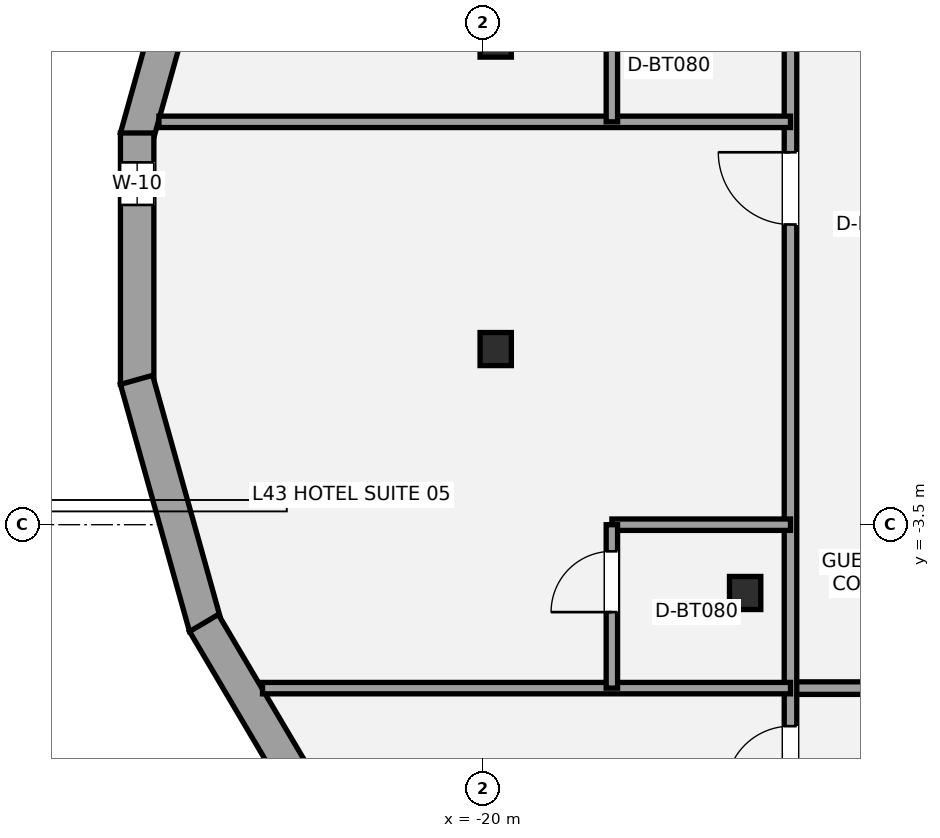
"""IFC4 building model, lengths in metres.
Left out: names, types, materials, properties, quantities, classifications, styles, units other than length and angle.
Written with IfcOpenShell. Run it as: python <this file> out.ifc"""

import sys

from ifc_helpers import new_model, si_unit, direction, frame, frame_2d, origin, origin_2d, place, context, subcontext, project, spatial, rectangle, i_section, extrude, element, fill, save


model = new_model("IFC4")
c1 = context("Model", 3, precision=1e-05, world=origin(), true_north=direction((0.0, 1.0)))
c2 = subcontext(c1, "Body", "Model", "MODEL_VIEW")
j1 = project(units=[si_unit("LENGTHUNIT", "METRE"), si_unit("PLANEANGLEUNIT", "RADIAN")], contexts=[c1])
p1 = place(None, origin())
s1 = spatial("IfcSite", under=j1, at=p1, CompositionType="ELEMENT")
p2 = place(p1, origin())
s2 = spatial("IfcBuilding", under=s1, at=p2, CompositionType="ELEMENT")
p3 = place(p2, frame((0.0, 0.0, 159.8)))
s3 = spatial("IfcBuildingStorey", under=s2, at=p3, CompositionType="ELEMENT", Elevation=159.8)
for number, where, z_axis, x_axis in (
    (1, (-19.828, 2.869, 0.0), (0.0, 0.0, 1.0), (1.0, 0.0, 0.0)),
    (2, (-19.828, -1.189, 0.0), (0.0, 0.0, 1.0), (1.0, 0.0, 0.0)),
    (3, (-16.547, -4.398, 0.0), (0.0, 0.0, 1.0), (1.0, 0.0, 0.0)),
):
    element("IfcColumn", number, at=place(p3, frame(where, z_axis=z_axis, x_axis=x_axis)), inside=s3, PredefinedType="COLUMN", context=c2, shape_type="SweptSolid", body=[
        extrude(i_section(OverallWidth=0.412, OverallDepth=0.435, WebThickness=0.036, FlangeThickness=0.057, at=origin_2d()), origin(), (0.0, 0.0, 1.0), 3.2),
    ])
p4 = place(p3, frame((-24.554, 1.594, 0.0), z_axis=(0.0, 0.0, 1.0), x_axis=(0.269235699479, 0.963074315993, 0.0)))
e4 = element("IfcWall", 4, at=p4, inside=s3, PredefinedType="STANDARD", context=c2, shape_type="SweptSolid", body=[
    extrude(rectangle(XDim=3.377, YDim=0.44, at=frame_2d((1.688, 0.0))), origin(), (0.0, 0.0, 1.0), 2.315),
])
p5 = place(p3, frame((-24.546, -1.654, 0.0), z_axis=(0.0, 0.0, 1.0), x_axis=(0.0, 1.0, 0.0)))
e5 = element("IfcWall", 5, at=p5, inside=s3, PredefinedType="STANDARD", context=c2, shape_type="SweptSolid", body=[
    extrude(rectangle(XDim=3.307, YDim=0.44, at=frame_2d((1.654, 0.0))), origin(), (0.0, 0.0, 1.0), 2.315),
])
p6 = place(p5, frame((2.36, 0.0, 0.58)))
e6 = element("IfcOpeningElement", 6, at=p6, cuts=e5, PredefinedType="OPENING", context=c2, shape_type="SweptSolid", body=[
    extrude(rectangle(XDim=0.56, YDim=1.15, at=frame_2d((0.28, 0.575))), frame((0.0, 0.23, 0.0), z_axis=(0.0, -1.0, 0.0), x_axis=(1.0, 0.0, 0.0)), (0.0, 0.0, 1.0), 0.46),
])
p7 = place(p3, frame((-23.645, -4.846, 0.0), z_axis=(0.0, 0.0, 1.0), x_axis=(-0.269235699479, 0.963074315993, 0.0)))
e7 = element("IfcWall", 7, at=p7, inside=s3, PredefinedType="STANDARD", context=c2, shape_type="SweptSolid", body=[
    extrude(rectangle(XDim=3.377, YDim=0.44, at=frame_2d((1.688, 0.0))), origin(), (0.0, 0.0, 1.0), 2.315),
])
p8 = place(p3, frame((-21.847, -7.873, 0.0), z_axis=(0.0, 0.0, 1.0), x_axis=(-0.508883387051, 0.860835465338, 0.0)))
e8 = element("IfcWall", 8, at=p8, inside=s3, PredefinedType="STANDARD", context=c2, shape_type="SweptSolid", body=[
    extrude(rectangle(XDim=3.577, YDim=0.44, at=frame_2d((1.788, 0.0))), origin(), (0.0, 0.0, 1.0), 2.315),
])
p9 = place(p3, frame((-15.95, -5.65, 0.0), z_axis=(0.0, 0.0, 1.0), x_axis=(1.0, 0.0, 0.0)))
e9 = element("IfcWall", 9, at=p9, inside=s3, PredefinedType="PARTITIONING", context=c2, shape_type="SweptSolid", body=[
    extrude(rectangle(XDim=31.5, YDim=0.165, at=frame_2d((15.75, 0.0))), origin(), (0.0, 0.0, 1.0), 2.398),
])
p10 = place(p9, frame((4.8, 0.0, 0.0)))
e10 = element("IfcOpeningElement", 10, at=p10, cuts=e9, PredefinedType="OPENING", context=c2, shape_type="SweptSolid", body=[
    extrude(rectangle(XDim=0.95, YDim=2.15, at=frame_2d((0.475, 1.075))), frame((0.0, 0.093, 0.0), z_axis=(0.0, -1.0, 0.0), x_axis=(1.0, 0.0, 0.0)), (0.0, 0.0, 1.0), 0.185),
])
p11 = place(p9, frame((12.8, 0.0, 0.0)))
e11 = element("IfcOpeningElement", 11, at=p11, cuts=e9, PredefinedType="OPENING", context=c2, shape_type="SweptSolid", body=[
    extrude(rectangle(XDim=0.95, YDim=2.15, at=frame_2d((0.475, 1.075))), frame((0.0, 0.093, 0.0), z_axis=(0.0, -1.0, 0.0), x_axis=(1.0, 0.0, 0.0)), (0.0, 0.0, 1.0), 0.185),
])
p12 = place(p9, frame((20.8, 0.0, 0.0)))
e12 = element("IfcOpeningElement", 12, at=p12, cuts=e9, PredefinedType="OPENING", context=c2, shape_type="SweptSolid", body=[
    extrude(rectangle(XDim=0.95, YDim=2.15, at=frame_2d((0.475, 1.075))), frame((0.0, 0.093, 0.0), z_axis=(0.0, -1.0, 0.0), x_axis=(1.0, 0.0, 0.0)), (0.0, 0.0, 1.0), 0.185),
])
p13 = place(p9, frame((30.15, 0.0, 0.0)))
e13 = element("IfcOpeningElement", 13, at=p13, cuts=e9, PredefinedType="OPENING", context=c2, shape_type="SweptSolid", body=[
    extrude(rectangle(XDim=0.95, YDim=2.15, at=frame_2d((0.475, 1.075))), frame((0.0, 0.093, 0.0), z_axis=(0.0, -1.0, 0.0), x_axis=(1.0, 0.0, 0.0)), (0.0, 0.0, 1.0), 0.185),
])
p14 = place(p3, frame((-15.95, -12.528, 0.0), z_axis=(0.0, 0.0, 1.0), x_axis=(0.0, 1.0, 0.0)))
e14 = element("IfcWall", 14, at=p14, inside=s3, PredefinedType="PARTITIONING", context=c2, shape_type="SweptSolid", body=[
    extrude(rectangle(XDim=20.078, YDim=0.165, at=frame_2d((10.039, 0.0))), origin(), (0.0, 0.0, 1.0), 2.473),
])
p15 = place(p14, frame((5.528, 0.0, 0.0)))
e15 = element("IfcOpeningElement", 15, at=p15, cuts=e14, PredefinedType="OPENING", context=c2, shape_type="SweptSolid", body=[
    extrude(rectangle(XDim=0.85, YDim=2.1, at=frame_2d((0.425, 1.05))), frame((0.0, 0.093, 0.0), z_axis=(0.0, -1.0, 0.0), x_axis=(1.0, 0.0, 0.0)), (0.0, 0.0, 1.0), 0.185),
])
p16 = place(p14, frame((12.978, 0.0, 0.0)))
e16 = element("IfcOpeningElement", 16, at=p16, cuts=e14, PredefinedType="OPENING", context=c2, shape_type="SweptSolid", body=[
    extrude(rectangle(XDim=0.95, YDim=2.15, at=frame_2d((0.475, 1.075))), frame((0.0, 0.093, 0.0), z_axis=(0.0, -1.0, 0.0), x_axis=(1.0, 0.0, 0.0)), (0.0, 0.0, 1.0), 0.185),
])
p17 = place(p14, frame((18.728, 0.0, 0.0)))
e17 = element("IfcOpeningElement", 17, at=p17, cuts=e14, PredefinedType="OPENING", context=c2, shape_type="SweptSolid", body=[
    extrude(rectangle(XDim=0.95, YDim=2.15, at=frame_2d((0.475, 1.075))), frame((0.0, 0.093, 0.0), z_axis=(0.0, -1.0, 0.0), x_axis=(1.0, 0.0, 0.0)), (0.0, 0.0, 1.0), 0.185),
])
p18 = place(p3, frame((-22.896, -5.65, 0.0), z_axis=(0.0, 0.0, 1.0), x_axis=(1.0, 0.0, 0.0)))
e18 = element("IfcWall", 18, at=p18, inside=s3, PredefinedType="PLUMBINGWALL", context=c2, shape_type="SweptSolid", body=[
    extrude(rectangle(XDim=6.947, YDim=0.15, at=frame_2d((3.473, 0.0))), origin(), (0.0, 0.0, 1.0), 2.473),
])
p19 = place(p3, frame((-24.26, 1.8, 0.0), z_axis=(0.0, 0.0, 1.0), x_axis=(1.0, 0.0, 0.0)))
e19 = element("IfcWall", 19, at=p19, inside=s3, PredefinedType="PLUMBINGWALL", context=c2, shape_type="SweptSolid", body=[
    extrude(rectangle(XDim=8.31, YDim=0.15, at=frame_2d((4.155, 0.0))), origin(), (0.0, 0.0, 1.0), 2.473),
])
p20 = place(p3, frame((-18.3, -3.5, 0.0), z_axis=(0.0, 0.0, 1.0), x_axis=(1.0, 0.0, 0.0)))
e20 = element("IfcWall", 20, at=p20, inside=s3, PredefinedType="PLUMBINGWALL", context=c2, shape_type="SweptSolid", body=[
    extrude(rectangle(XDim=2.35, YDim=0.15, at=frame_2d((1.175, 0.0))), origin(), (0.0, 0.0, 1.0), 2.398),
])
p21 = place(p3, frame((-18.3, -5.65, 0.0), z_axis=(0.0, 0.0, 1.0), x_axis=(0.0, 1.0, 0.0)))
e21 = element("IfcWall", 21, at=p21, inside=s3, PredefinedType="PLUMBINGWALL", context=c2, shape_type="SweptSolid", body=[
    extrude(rectangle(XDim=2.15, YDim=0.15, at=frame_2d((1.075, 0.0))), origin(), (0.0, 0.0, 1.0), 2.473),
])
p22 = place(p21, frame((1.0, 0.0, 0.0)))
e22 = element("IfcOpeningElement", 22, at=p22, cuts=e21, PredefinedType="OPENING", context=c2, shape_type="SweptSolid", body=[
    extrude(rectangle(XDim=0.8, YDim=2.1, at=frame_2d((0.4, 1.05))), frame((0.0, 0.085, 0.0), z_axis=(0.0, -1.0, 0.0), x_axis=(1.0, 0.0, 0.0)), (0.0, 0.0, 1.0), 0.17),
])
p23 = place(p3, frame((-18.3, 1.8, 0.0), z_axis=(0.0, 0.0, 1.0), x_axis=(0.0, 1.0, 0.0)))
e23 = element("IfcWall", 23, at=p23, inside=s3, PredefinedType="PLUMBINGWALL", context=c2, shape_type="SweptSolid", body=[
    extrude(rectangle(XDim=1.85, YDim=0.15, at=frame_2d((0.925, 0.0))), origin(), (0.0, 0.0, 1.0), 3.02),
])
p24 = place(p6, origin())
e24 = element("IfcWindow", 24, at=p24, inside=s3, PartitioningType="SINGLE_PANEL", PredefinedType="WINDOW", context=c2, shape_type="SweptSolid", body=[
    extrude(rectangle(XDim=0.56, YDim=1.15, at=frame_2d((0.28, 0.575))), frame((0.0, -0.01, 0.0), z_axis=(0.0, -1.0, 0.0), x_axis=(1.0, 0.0, 0.0)), (0.0, 0.0, 1.0), 0.06),
])
fill(e6, e24)
p25 = place(p15, origin())
e25 = element("IfcDoor", 25, at=p25, inside=s3, OperationType="SINGLE_SWING_LEFT", PredefinedType="DOOR", context=c2, shape_type="SweptSolid", body=[
    extrude(rectangle(XDim=0.85, YDim=2.1, at=frame_2d((0.425, 1.05))), frame((0.0, 0.025, 0.0), z_axis=(0.0, -1.0, 0.0), x_axis=(1.0, 0.0, 0.0)), (0.0, 0.0, 1.0), 0.05),
])
fill(e15, e25)
p26 = place(p16, origin())
e26 = element("IfcDoor", 26, at=p26, inside=s3, OperationType="SINGLE_SWING_RIGHT", PredefinedType="DOOR", context=c2, shape_type="SweptSolid", body=[
    extrude(rectangle(XDim=0.95, YDim=2.15, at=frame_2d((0.475, 1.075))), frame((0.0, 0.025, 0.0), z_axis=(0.0, -1.0, 0.0), x_axis=(1.0, 0.0, 0.0)), (0.0, 0.0, 1.0), 0.05),
])
fill(e16, e26)
p27 = place(p22, origin())
e27 = element("IfcDoor", 27, at=p27, inside=s3, OperationType="SINGLE_SWING_LEFT", PredefinedType="DOOR", context=c2, shape_type="SweptSolid", body=[
    extrude(rectangle(XDim=0.8, YDim=2.1, at=frame_2d((0.4, 1.05))), frame((0.0, 0.025, 0.0), z_axis=(0.0, -1.0, 0.0), x_axis=(1.0, 0.0, 0.0)), (0.0, 0.0, 1.0), 0.05),
])
fill(e22, e27)
save(model, sys.argv[1])
